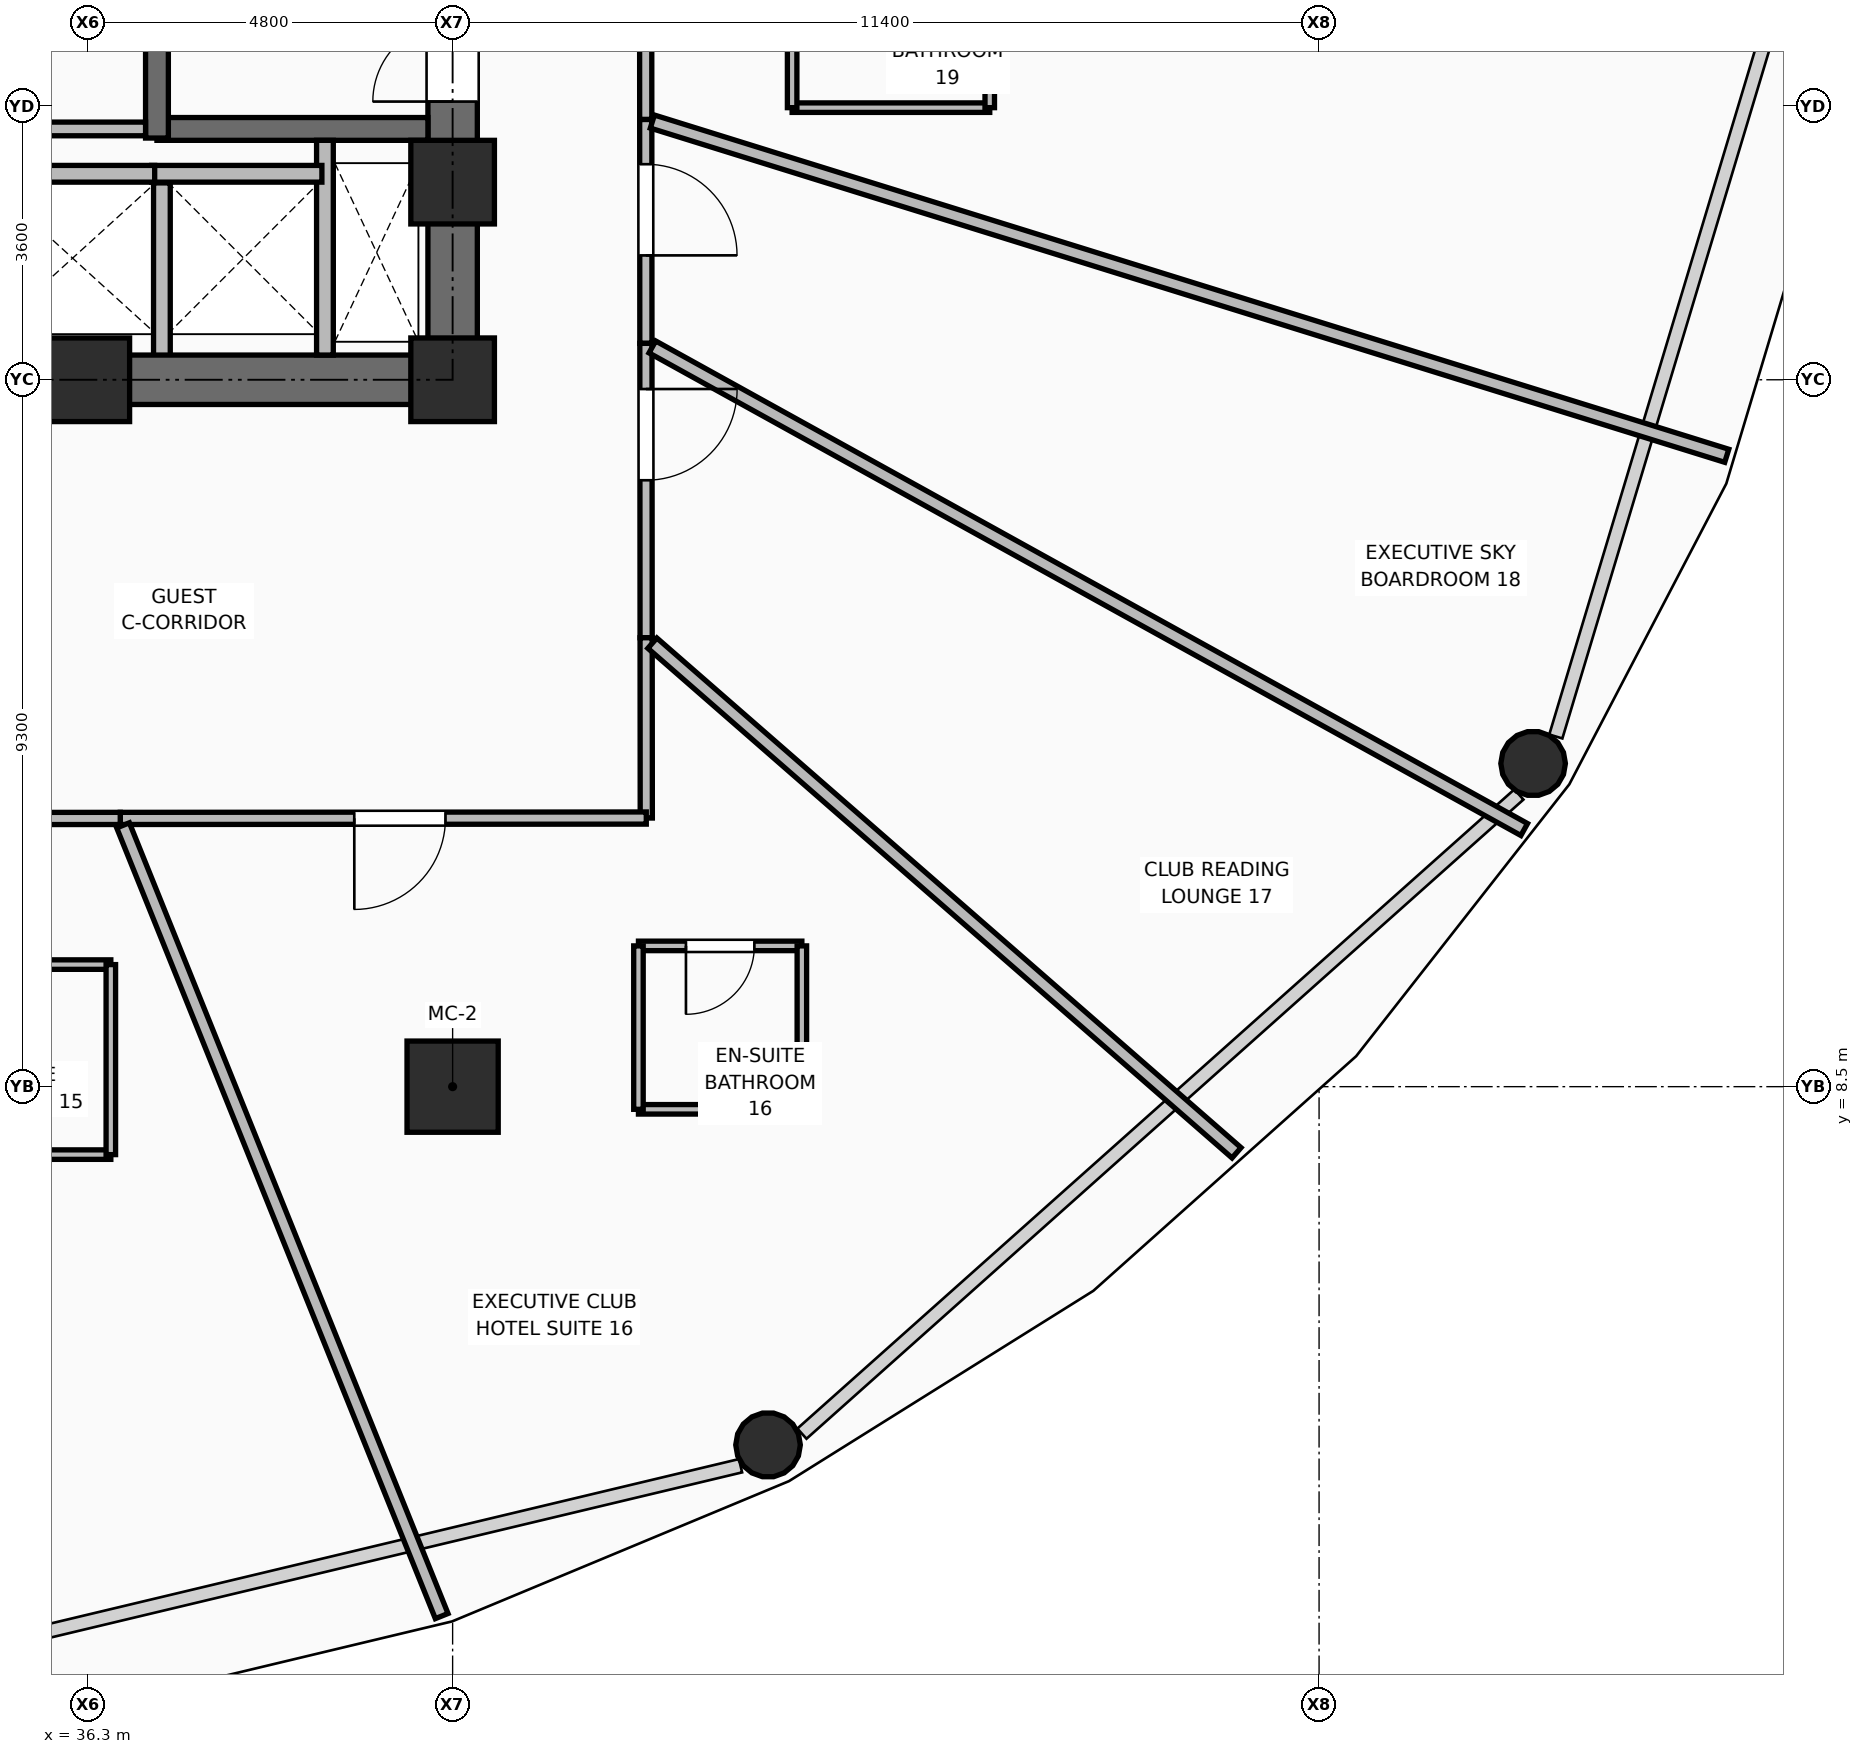
"""IFC4 building model, lengths in metres.
Left out: names, types, materials, properties, quantities, classifications, styles, units other than length and angle.
Written with IfcOpenShell. Run it as: python <this file> out.ifc"""

import sys

from ifc_helpers import new_model, si_unit, direction, frame, frame_2d, origin, origin_2d, place, context, subcontext, project, spatial, rectangle, hollow_rectangle, hollow_circle, extrude, element, fill, save


model = new_model("IFC4")
c1 = context("Model", 3, precision=1e-05, world=origin(), true_north=direction((0.0, 1.0)))
c2 = subcontext(c1, "Body", "Model", "MODEL_VIEW")
j1 = project(units=[si_unit("LENGTHUNIT", "METRE"), si_unit("PLANEANGLEUNIT", "RADIAN")], contexts=[c1])
p1 = place(None, origin())
s1 = spatial("IfcSite", under=j1, at=p1, CompositionType="ELEMENT")
p2 = place(p1, origin())
s2 = spatial("IfcBuilding", under=s1, at=p2, CompositionType="ELEMENT")
p3 = place(p2, frame((0.0, 0.0, 79.5)))
s3 = spatial("IfcBuildingStorey", under=s2, at=p3, CompositionType="ELEMENT", Elevation=79.5)
for number, where, z_axis, x_axis in (
    (1, (36.3, 17.8, 0.0), (0.0, 0.0, 1.0), (1.0, 0.0, 0.0)),
    (2, (41.1, 17.8, 0.0), (0.0, 0.0, 1.0), (1.0, 0.0, 0.0)),
    (3, (41.1, 20.4, 0.0), (0.0, 0.0, 1.0), (1.0, 0.0, 0.0)),
):
    element("IfcColumn", number, at=place(p3, frame(where, z_axis=z_axis, x_axis=x_axis)), inside=s3, PredefinedType="COLUMN", context=c2, shape_type="SweptSolid", body=[
        extrude(rectangle(XDim=1.1, YDim=1.1, at=origin_2d()), origin(), (0.0, 0.0, 1.0), 3.75),
    ])
p4 = place(p3, frame((41.1, 8.5, 0.0), z_axis=(0.0, 0.0, 1.0), x_axis=(1.0, 0.0, 0.0)))
e4 = element("IfcColumn", 4, at=p4, inside=s3, PredefinedType="COLUMN", context=c2, shape_type="SweptSolid", body=[
    extrude(hollow_rectangle(XDim=1.2, YDim=1.2, WallThickness=0.045, at=origin_2d()), origin(), (0.0, 0.0, 1.0), 3.75),
])
for number, where, z_axis, x_axis in (
    (5, (45.25, 3.787, 0.0), (0.0, 0.0, 1.0), (1.0, 0.0, 0.0)),
    (6, (55.316, 12.752, 0.0), (0.0, 0.0, 1.0), (1.0, 0.0, 0.0)),
):
    element("IfcColumn", number, at=place(p3, frame(where, z_axis=z_axis, x_axis=x_axis)), inside=s3, PredefinedType="COLUMN", context=c2, shape_type="SweptSolid", body=[
        extrude(hollow_circle(Radius=0.425, WallThickness=0.04, at=origin_2d()), origin(), (0.0, 0.0, 1.0), 3.57),
    ])
p5 = place(p3, frame((37.275, 18.08, 0.0), z_axis=(0.0, 0.0, 1.0), x_axis=(0.0, 1.0, 0.0)))
e7 = element("IfcWall", 7, at=p5, inside=s3, PredefinedType="PARTITIONING", context=c2, shape_type="SweptSolid", body=[
    extrude(rectangle(XDim=2.31, YDim=0.22, at=frame_2d((1.155, 0.0))), origin(), (0.0, 0.0, 1.0), 3.545),
])
p6 = place(p3, frame((34.95, 17.8, 0.0), z_axis=(0.0, 0.0, 1.0), x_axis=(1.0, 0.0, 0.0)))
e8 = element("IfcWall", 8, at=p6, inside=s3, PredefinedType="SHEAR", context=c2, shape_type="SweptSolid", body=[
    extrude(rectangle(XDim=6.475, YDim=0.65, at=frame_2d((3.238, 0.0))), origin(), (0.0, 0.0, 1.0), 3.57),
])
p7 = place(p3, frame((41.1, 18.125, 0.0), z_axis=(0.0, 0.0, 1.0), x_axis=(0.0, 1.0, 0.0)))
e9 = element("IfcWall", 9, at=p7, inside=s3, PredefinedType="SHEAR", context=c2, shape_type="SweptSolid", body=[
    extrude(rectangle(XDim=14.0, YDim=0.65, at=frame_2d((7.0, 0.0))), origin(), (0.0, 0.0, 1.0), 3.57),
])
p8 = place(p7, frame((3.335, 0.0, 0.0)))
e10 = element("IfcOpeningElement", 10, at=p8, cuts=e9, PredefinedType="OPENING", context=c2, shape_type="SweptSolid", body=[
    extrude(rectangle(XDim=1.05, YDim=2.1, at=frame_2d((0.525, 1.05))), frame((0.0, 0.335, 0.0), z_axis=(0.0, -1.0, 0.0), x_axis=(1.0, 0.0, 0.0)), (0.0, 0.0, 1.0), 0.67),
])
p9 = place(p3, frame((37.21, 21.1, 0.0), z_axis=(0.0, 0.0, 1.0), x_axis=(1.0, 0.0, 0.0)))
e11 = element("IfcWall", 11, at=p9, inside=s3, PredefinedType="SHEAR", context=c2, shape_type="SweptSolid", body=[
    extrude(rectangle(XDim=3.565, YDim=0.3, at=frame_2d((1.782, 0.0))), origin(), (0.0, 0.0, 1.0), 3.57),
])
p10 = place(p3, frame((37.21, 20.98, 0.0), z_axis=(0.0, 0.0, 1.0), x_axis=(0.0, 1.0, 0.0)))
e12 = element("IfcWall", 12, at=p10, inside=s3, PredefinedType="SHEAR", context=c2, shape_type="SweptSolid", body=[
    extrude(rectangle(XDim=7.99, YDim=0.3, at=frame_2d((3.995, 0.0))), origin(), (0.0, 0.0, 1.0), 3.57),
])
p11 = place(p3, frame((39.42, 18.125, 0.0), z_axis=(0.0, 0.0, 1.0), x_axis=(0.0, 1.0, 0.0)))
e13 = element("IfcWall", 13, at=p11, inside=s3, PredefinedType="PARTITIONING", context=c2, shape_type="SweptSolid", body=[
    extrude(rectangle(XDim=2.825, YDim=0.22, at=frame_2d((1.413, 0.0))), origin(), (0.0, 0.0, 1.0), 3.55),
])
for number, where, z_axis, x_axis in (
    (14, (37.14, 20.51, 0.0), (0.0, 0.0, 1.0), (1.0, 0.0, 0.0)),
    (15, (34.94, 20.51, 0.0), (0.0, 0.0, 1.0), (1.0, 0.0, 0.0)),
):
    element("IfcWall", number, at=place(p3, frame(where, z_axis=z_axis, x_axis=x_axis)), inside=s3, PredefinedType="PARTITIONING", context=c2, shape_type="SweptSolid", body=[
        extrude(rectangle(XDim=2.24, YDim=0.22, at=frame_2d((1.12, 0.0))), origin(), (0.0, 0.0, 1.0), 3.55),
    ])
p12 = place(p3, frame((34.98, 21.1, 0.0), z_axis=(0.0, 0.0, 1.0), x_axis=(1.0, 0.0, 0.0)))
e16 = element("IfcWall", 16, at=p12, inside=s3, PredefinedType="PARTITIONING", context=c2, shape_type="SweptSolid", body=[
    extrude(rectangle(XDim=2.08, YDim=0.18, at=frame_2d((1.04, 0.0))), origin(), (0.0, 0.0, 1.0), 3.55),
])
p13 = place(p3, frame((43.638, 26.152, 0.0), z_axis=(0.0, 0.0, 1.0), x_axis=(0.000644042472, -0.999999792605, 0.0)))
e17 = element("IfcWall", 17, at=p13, inside=s3, PredefinedType="PARTITIONING", context=c2, shape_type="SweptSolid", body=[
    extrude(rectangle(XDim=4.928, YDim=0.16, at=frame_2d((2.464, 0.0))), origin(), (0.0, 0.0, 1.0), 2.928),
])
p14 = place(p13, frame((1.79, 0.0, 0.0)))
e18 = element("IfcOpeningElement", 18, at=p14, cuts=e17, PredefinedType="OPENING", context=c2, shape_type="SweptSolid", body=[
    extrude(rectangle(XDim=1.2, YDim=2.1, at=frame_2d((0.6, 1.05))), frame((0.0, 0.09, 0.0), z_axis=(0.0, -1.0, 0.0), x_axis=(1.0, 0.0, 0.0)), (0.0, 0.0, 1.0), 0.18),
])
p15 = place(p3, frame((43.641, 21.224, 0.0), z_axis=(0.0, 0.0, 1.0), x_axis=(0.0006631848, -0.999999780093, 0.0)))
e19 = element("IfcWall", 19, at=p15, inside=s3, PredefinedType="PARTITIONING", context=c2, shape_type="SweptSolid", body=[
    extrude(rectangle(XDim=2.945, YDim=0.16, at=frame_2d((1.473, 0.0))), origin(), (0.0, 0.0, 1.0), 2.928),
])
p16 = place(p15, frame((0.588, 0.0, 0.0)))
e20 = element("IfcOpeningElement", 20, at=p16, cuts=e19, PredefinedType="OPENING", context=c2, shape_type="SweptSolid", body=[
    extrude(rectangle(XDim=1.2, YDim=2.1, at=frame_2d((0.6, 1.05))), frame((0.0, 0.09, 0.0), z_axis=(0.0, -1.0, 0.0), x_axis=(1.0, 0.0, 0.0)), (0.0, 0.0, 1.0), 0.18),
])
p17 = place(p3, frame((43.643, 18.279, 0.0), z_axis=(0.0, 0.0, 1.0), x_axis=(0.000756429436, -0.999999713907, 0.0)))
e21 = element("IfcWall", 21, at=p17, inside=s3, PredefinedType="PARTITIONING", context=c2, shape_type="SweptSolid", body=[
    extrude(rectangle(XDim=3.873, YDim=0.16, at=frame_2d((1.937, 0.0))), origin(), (0.0, 0.0, 1.0), 2.928),
])
p18 = place(p17, frame((0.601, 0.0, 0.0)))
e22 = element("IfcOpeningElement", 22, at=p18, cuts=e21, PredefinedType="OPENING", context=c2, shape_type="SweptSolid", body=[
    extrude(rectangle(XDim=1.2, YDim=2.1, at=frame_2d((0.6, 1.05))), frame((0.0, 0.09, 0.0), z_axis=(0.0, -1.0, 0.0), x_axis=(1.0, 0.0, 0.0)), (0.0, 0.0, 1.0), 0.18),
])
p19 = place(p3, frame((43.646, 14.406, 0.0), z_axis=(0.0, 0.0, 1.0), x_axis=(0.00082338383, -0.999999661019, 0.0)))
e23 = element("IfcWall", 23, at=p19, inside=s3, PredefinedType="PARTITIONING", context=c2, shape_type="SweptSolid", body=[
    extrude(rectangle(XDim=2.372, YDim=0.16, at=frame_2d((1.186, 0.0))), origin(), (0.0, 0.0, 1.0), 3.55),
])
p20 = place(p3, frame((43.648, 12.034, 0.0), z_axis=(0.0, 0.0, 1.0), x_axis=(-0.999999751123, -0.000705516968, 0.0)))
e24 = element("IfcWall", 24, at=p20, inside=s3, PredefinedType="PARTITIONING", context=c2, shape_type="SweptSolid", body=[
    extrude(rectangle(XDim=6.921, YDim=0.16, at=frame_2d((3.46, 0.0))), origin(), (0.0, 0.0, 1.0), 2.928),
])
p21 = place(p20, frame((2.642, 0.0, 0.0)))
e25 = element("IfcOpeningElement", 25, at=p21, cuts=e24, PredefinedType="OPENING", context=c2, shape_type="SweptSolid", body=[
    extrude(rectangle(XDim=1.2, YDim=2.1, at=frame_2d((0.6, 1.05))), frame((0.0, 0.09, 0.0), z_axis=(0.0, -1.0, 0.0), x_axis=(1.0, 0.0, 0.0)), (0.0, 0.0, 1.0), 0.18),
])
p22 = place(p3, frame((36.727, 12.029, 0.0), z_axis=(0.0, 0.0, 1.0), x_axis=(-0.999999710434, -0.000761007209, 0.0)))
e26 = element("IfcWall", 26, at=p22, inside=s3, PredefinedType="PARTITIONING", context=c2, shape_type="SweptSolid", body=[
    extrude(rectangle(XDim=6.737, YDim=0.16, at=frame_2d((3.369, 0.0))), origin(), (0.0, 0.0, 1.0), 2.928),
])
p23 = place(p22, frame((2.843, 0.0, 0.0)))
e27 = element("IfcOpeningElement", 27, at=p23, cuts=e26, PredefinedType="OPENING", context=c2, shape_type="SweptSolid", body=[
    extrude(rectangle(XDim=1.2, YDim=2.1, at=frame_2d((0.6, 1.05))), frame((0.0, 0.09, 0.0), z_axis=(0.0, -1.0, 0.0), x_axis=(1.0, 0.0, 0.0)), (0.0, 0.0, 1.0), 0.18),
])
p24 = place(p3, frame((36.764, 11.938, 0.0), z_axis=(0.0, 0.0, 1.0), x_axis=(0.373765091029, -0.927523399558, 0.0)))
e28 = element("IfcWall", 28, at=p24, inside=s3, PredefinedType="PARTITIONING", context=c2, shape_type="SweptSolid", body=[
    extrude(rectangle(XDim=11.216, YDim=0.18, at=frame_2d((5.608, 0.0))), origin(), (0.0, 0.0, 1.0), 2.775),
])
p25 = place(p3, frame((43.728, 14.335, 0.0), z_axis=(0.0, 0.0, 1.0), x_axis=(0.753557452015, -0.657382055211, 0.0)))
e29 = element("IfcWall", 29, at=p25, inside=s3, PredefinedType="PARTITIONING", context=c2, shape_type="SweptSolid", body=[
    extrude(rectangle(XDim=10.2, YDim=0.18, at=frame_2d((5.1, 0.0))), origin(), (0.0, 0.0, 1.0), 2.775),
])
p26 = place(p3, frame((43.728, 18.232, 0.0), z_axis=(0.0, 0.0, 1.0), x_axis=(0.874929134989, -0.484250977022, 0.0)))
e30 = element("IfcWall", 30, at=p26, inside=s3, PredefinedType="PARTITIONING", context=c2, shape_type="SweptSolid", body=[
    extrude(rectangle(XDim=13.111, YDim=0.18, at=frame_2d((6.555, 0.0))), origin(), (0.0, 0.0, 1.0), 2.775),
])
p27 = place(p3, frame((43.728, 21.197, 0.0), z_axis=(0.0, 0.0, 1.0), x_axis=(0.954873823144, -0.297011753766, 0.0)))
e31 = element("IfcWall", 31, at=p27, inside=s3, PredefinedType="PARTITIONING", context=c2, shape_type="SweptSolid", body=[
    extrude(rectangle(XDim=14.804, YDim=0.18, at=frame_2d((7.402, 0.0))), origin(), (0.0, 0.0, 1.0), 2.775),
])
p28 = place(p3, frame((34.003, 7.606, 0.0), z_axis=(0.0, 0.0, 1.0), x_axis=(1.0, 0.0, 0.0)))
e32 = element("IfcWall", 32, at=p28, inside=s3, PredefinedType="PARTITIONING", context=c2, shape_type="SweptSolid", body=[
    extrude(rectangle(XDim=2.6, YDim=0.125, at=frame_2d((1.3, 0.0))), origin(), (0.0, 0.0, 1.0), 3.55),
])
p29 = place(p3, frame((34.003, 10.106, 0.0), z_axis=(0.0, 0.0, 1.0), x_axis=(1.0, 0.0, 0.0)))
e33 = element("IfcWall", 33, at=p29, inside=s3, PredefinedType="PARTITIONING", context=c2, shape_type="SweptSolid", body=[
    extrude(rectangle(XDim=2.6, YDim=0.125, at=frame_2d((1.3, 0.0))), origin(), (0.0, 0.0, 1.0), 3.55),
])
p30 = place(p29, frame((0.85, 0.0, 0.0)))
e34 = element("IfcOpeningElement", 34, at=p30, cuts=e33, PredefinedType="OPENING", context=c2, shape_type="SweptSolid", body=[
    extrude(rectangle(XDim=0.9, YDim=2.1, at=frame_2d((0.45, 1.05))), frame((0.0, 0.073, 0.0), z_axis=(0.0, -1.0, 0.0), x_axis=(1.0, 0.0, 0.0)), (0.0, 0.0, 1.0), 0.145),
])
p31 = place(p3, frame((36.603, 7.606, 0.0), z_axis=(0.0, 0.0, 1.0), x_axis=(0.0, 1.0, 0.0)))
e35 = element("IfcWall", 35, at=p31, inside=s3, PredefinedType="PARTITIONING", context=c2, shape_type="SweptSolid", body=[
    extrude(rectangle(XDim=2.5, YDim=0.125, at=frame_2d((1.25, 0.0))), origin(), (0.0, 0.0, 1.0), 3.55),
])
p32 = place(p3, frame((43.545, 8.202, 0.0), z_axis=(0.0, 0.0, 1.0), x_axis=(1.0, 0.0, 0.0)))
e36 = element("IfcWall", 36, at=p32, inside=s3, PredefinedType="PARTITIONING", context=c2, shape_type="SweptSolid", body=[
    extrude(rectangle(XDim=2.15, YDim=0.125, at=frame_2d((1.075, 0.0))), origin(), (0.0, 0.0, 1.0), 2.928),
])
p33 = place(p3, frame((43.545, 10.352, 0.0), z_axis=(0.0, 0.0, 1.0), x_axis=(1.0, 0.0, 0.0)))
e37 = element("IfcWall", 37, at=p33, inside=s3, PredefinedType="PARTITIONING", context=c2, shape_type="SweptSolid", body=[
    extrude(rectangle(XDim=2.15, YDim=0.125, at=frame_2d((1.075, 0.0))), origin(), (0.0, 0.0, 1.0), 2.928),
])
p34 = place(p33, frame((0.625, 0.0, 0.0)))
e38 = element("IfcOpeningElement", 38, at=p34, cuts=e37, PredefinedType="OPENING", context=c2, shape_type="SweptSolid", body=[
    extrude(rectangle(XDim=0.9, YDim=2.1, at=frame_2d((0.45, 1.05))), frame((0.0, 0.073, 0.0), z_axis=(0.0, -1.0, 0.0), x_axis=(1.0, 0.0, 0.0)), (0.0, 0.0, 1.0), 0.145),
])
p35 = place(p3, frame((43.545, 8.202, 0.0), z_axis=(0.0, 0.0, 1.0), x_axis=(0.0, 1.0, 0.0)))
e39 = element("IfcWall", 39, at=p35, inside=s3, PredefinedType="PARTITIONING", context=c2, shape_type="SweptSolid", body=[
    extrude(rectangle(XDim=2.15, YDim=0.125, at=frame_2d((1.075, 0.0))), origin(), (0.0, 0.0, 1.0), 2.928),
])
p36 = place(p3, frame((45.695, 8.202, 0.0), z_axis=(0.0, 0.0, 1.0), x_axis=(0.0, 1.0, 0.0)))
e40 = element("IfcWall", 40, at=p36, inside=s3, PredefinedType="PARTITIONING", context=c2, shape_type="SweptSolid", body=[
    extrude(rectangle(XDim=2.15, YDim=0.125, at=frame_2d((1.075, 0.0))), origin(), (0.0, 0.0, 1.0), 3.55),
])
p37 = place(p3, frame((45.567, 21.38, 0.0), z_axis=(0.0, 0.0, 1.0), x_axis=(1.0, 0.0, 0.0)))
e41 = element("IfcWall", 41, at=p37, inside=s3, PredefinedType="PARTITIONING", context=c2, shape_type="SweptSolid", body=[
    extrude(rectangle(XDim=2.6, YDim=0.125, at=frame_2d((1.3, 0.0))), origin(), (0.0, 0.0, 1.0), 2.928),
])
p38 = place(p3, frame((45.567, 21.38, 0.0), z_axis=(0.0, 0.0, 1.0), x_axis=(0.0, 1.0, 0.0)))
e42 = element("IfcWall", 42, at=p38, inside=s3, PredefinedType="PARTITIONING", context=c2, shape_type="SweptSolid", body=[
    extrude(rectangle(XDim=2.5, YDim=0.125, at=frame_2d((1.25, 0.0))), origin(), (0.0, 0.0, 1.0), 2.928),
])
p39 = place(p38, frame((0.8, 0.0, 0.0)))
e43 = element("IfcOpeningElement", 43, at=p39, cuts=e42, PredefinedType="OPENING", context=c2, shape_type="SweptSolid", body=[
    extrude(rectangle(XDim=0.9, YDim=2.1, at=frame_2d((0.45, 1.05))), frame((0.0, 0.073, 0.0), z_axis=(0.0, -1.0, 0.0), x_axis=(1.0, 0.0, 0.0)), (0.0, 0.0, 1.0), 0.145),
])
p40 = place(p3, frame((48.167, 21.38, 0.0), z_axis=(0.0, 0.0, 1.0), x_axis=(0.0, 1.0, 0.0)))
e44 = element("IfcWall", 44, at=p40, inside=s3, PredefinedType="PARTITIONING", context=c2, shape_type="SweptSolid", body=[
    extrude(rectangle(XDim=2.5, YDim=0.125, at=frame_2d((1.25, 0.0))), origin(), (0.0, 0.0, 1.0), 2.928),
])
p41 = place(p8, origin())
e45 = element("IfcDoor", 45, at=p41, inside=s3, OperationType="SINGLE_SWING_LEFT", PredefinedType="DOOR", context=c2, shape_type="SweptSolid", body=[
    extrude(rectangle(XDim=1.05, YDim=2.1, at=frame_2d((0.525, 1.05))), frame((0.0, 0.025, 0.0), z_axis=(0.0, -1.0, 0.0), x_axis=(1.0, 0.0, 0.0)), (0.0, 0.0, 1.0), 0.05),
])
fill(e10, e45)
p42 = place(p34, frame((0.9, 0.0, 0.0), z_axis=(0.0, 0.0, 1.0), x_axis=(-1.0, 0.0, 0.0)))
e46 = element("IfcDoor", 46, at=p42, inside=s3, OperationType="SINGLE_SWING_RIGHT", PredefinedType="DOOR", context=c2, shape_type="SweptSolid", body=[
    extrude(rectangle(XDim=0.9, YDim=2.1, at=frame_2d((0.45, 1.05))), frame((0.0, 0.025, 0.0), z_axis=(0.0, -1.0, 0.0), x_axis=(1.0, 0.0, 0.0)), (0.0, 0.0, 1.0), 0.05),
])
fill(e38, e46)
p43 = place(p21, origin())
e47 = element("IfcDoor", 47, at=p43, inside=s3, OperationType="SINGLE_SWING_RIGHT", PredefinedType="DOOR", context=c2, shape_type="SweptSolid", body=[
    extrude(rectangle(XDim=1.2, YDim=2.1, at=frame_2d((0.6, 1.05))), frame((0.0, 0.025, 0.0), z_axis=(0.0, -1.0, 0.0), x_axis=(1.0, 0.0, 0.0)), (0.0, 0.0, 1.0), 0.05),
])
fill(e25, e47)
p44 = place(p18, origin())
e48 = element("IfcDoor", 48, at=p44, inside=s3, OperationType="SINGLE_SWING_LEFT", PredefinedType="DOOR", context=c2, shape_type="SweptSolid", body=[
    extrude(rectangle(XDim=1.2, YDim=2.1, at=frame_2d((0.6, 1.05))), frame((0.0, 0.025, 0.0), z_axis=(0.0, -1.0, 0.0), x_axis=(1.0, 0.0, 0.0)), (0.0, 0.0, 1.0), 0.05),
])
fill(e22, e48)
p45 = place(p16, origin())
e49 = element("IfcDoor", 49, at=p45, inside=s3, OperationType="SINGLE_SWING_RIGHT", PredefinedType="DOOR", context=c2, shape_type="SweptSolid", body=[
    extrude(rectangle(XDim=1.2, YDim=2.1, at=frame_2d((0.6, 1.05))), frame((0.0, 0.025, 0.0), z_axis=(0.0, -1.0, 0.0), x_axis=(1.0, 0.0, 0.0)), (0.0, 0.0, 1.0), 0.05),
])
fill(e20, e49)
save(model, sys.argv[1])
